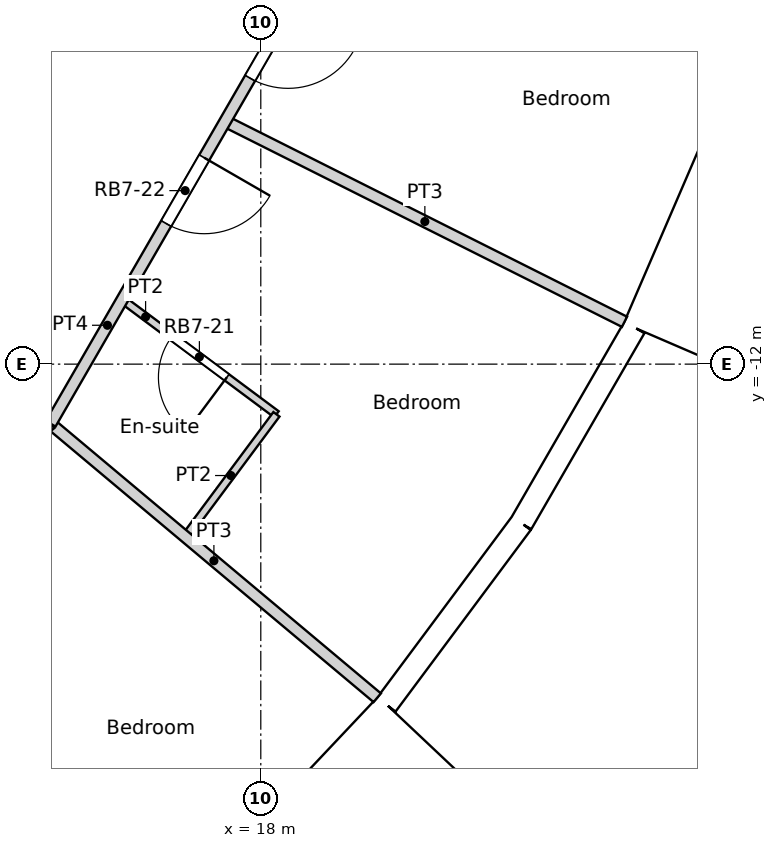
"""IFC4 building model, lengths in metres.
Left out: names, types, materials, properties, quantities, classifications, styles, units other than length and angle.
Written with IfcOpenShell. Run it as: python <this file> out.ifc"""

import sys

from ifc_helpers import new_model, si_unit, direction, frame, frame_2d, origin, origin_2d, place, context, subcontext, project, spatial, rectangle, circle, extrude, element, fill, save


model = new_model("IFC4")
c1 = context("Model", 3, precision=1e-05, world=origin(), true_north=direction((0.0, 1.0)))
c2 = subcontext(c1, "Body", "Model", "MODEL_VIEW")
j1 = project(units=[si_unit("LENGTHUNIT", "METRE"), si_unit("PLANEANGLEUNIT", "RADIAN")], contexts=[c1])
p1 = place(None, origin())
s1 = spatial("IfcSite", under=j1, at=p1, CompositionType="ELEMENT")
p2 = place(p1, origin())
s2 = spatial("IfcBuilding", under=s1, at=p2, CompositionType="ELEMENT")
p3 = place(p2, frame((0.0, 0.0, 190.8)))
s3 = spatial("IfcBuildingStorey", under=s2, at=p3, CompositionType="ELEMENT", Elevation=190.8)
for number, where, z_axis, x_axis in (
    (1, (18.805, -15.779, 0.0), (0.0, 0.0, 1.0), (1.0, 0.0, 0.0)),
    (2, (21.937, -11.017, 0.0), (0.0, 0.0, 1.0), (1.0, 0.0, 0.0)),
):
    element("IfcColumn", number, at=place(p3, frame(where, z_axis=z_axis, x_axis=x_axis)), inside=s3, PredefinedType="COLUMN", context=c2, shape_type="SweptSolid", body=[
        extrude(circle(Radius=0.6, at=origin_2d()), origin(), (0.0, 0.0, 1.0), 3.6),
    ])
p4 = place(p3, frame((15.552, -10.603, 0.0), z_axis=(0.0, 0.0, 1.0), x_axis=(1.0, 0.0, 0.0)))
e3 = element("IfcColumn", 3, at=p4, inside=s3, PredefinedType="COLUMN", context=c2, shape_type="SweptSolid", body=[
    extrude(circle(Radius=0.65, at=origin_2d()), origin(), (0.0, 0.0, 1.0), 3.6),
])
p5 = place(p3, frame((18.013, -19.056, -0.3), z_axis=(0.0, 0.0, 1.0), x_axis=(0.686217177108, 0.727396718334, 0.0)))
e4 = element("IfcWall", 4, at=p5, inside=s3, PredefinedType="ELEMENTEDWALL", context=c2, shape_type="SweptSolid", body=[
    extrude(rectangle(XDim=3.0, YDim=1.45, at=frame_2d((1.5, 0.0))), origin(), (0.0, 0.0, 1.0), 3.6),
])
p6 = place(p5, frame((1.5, 0.0, 1.85)))
e5 = element("IfcOpeningElement", 5, at=p6, cuts=e4, PredefinedType="OPENING", context=c2, shape_type="SweptSolid", body=[
    extrude(circle(Radius=0.9, at=origin_2d()), frame((0.0, 0.735, 0.0), z_axis=(0.0, -1.0, 0.0), x_axis=(1.0, 0.0, 0.0)), (0.0, 0.0, 1.0), 1.47),
])
p7 = place(p3, frame((19.653, -16.478, 0.0), z_axis=(0.0, 0.0, 1.0), x_axis=(0.597197580538, 0.80209416517, 0.0)))
e6 = element("IfcWall", 6, at=p7, inside=s3, PredefinedType="SOLIDWALL", context=c2, shape_type="SweptSolid", body=[
    extrude(rectangle(XDim=2.973, YDim=0.3, at=frame_2d((1.486, 0.0))), origin(), (0.0, 0.0, 1.0), 2.8),
])
p8 = place(p7, frame((1.486, 0.0, 1.55)))
e7 = element("IfcOpeningElement", 7, at=p8, cuts=e6, PredefinedType="OPENING", context=c2, shape_type="SweptSolid", body=[
    extrude(circle(Radius=0.9, at=origin_2d()), frame((0.0, 0.16, 0.0), z_axis=(0.0, -1.0, 0.0), x_axis=(1.0, 0.0, 0.0)), (0.0, 0.0, 1.0), 0.32),
])
p9 = place(p3, frame((21.428, -14.094, 0.0), z_axis=(0.0, 0.0, 1.0), x_axis=(0.499954672104, 0.866051572276, 0.0)))
e8 = element("IfcWall", 8, at=p9, inside=s3, PredefinedType="SOLIDWALL", context=c2, shape_type="SweptSolid", body=[
    extrude(rectangle(XDim=2.973, YDim=0.3, at=frame_2d((1.486, 0.0))), origin(), (0.0, 0.0, 1.0), 3.3),
])
p10 = place(p9, frame((1.486, 0.0, 1.55)))
e9 = element("IfcOpeningElement", 9, at=p10, cuts=e8, PredefinedType="OPENING", context=c2, shape_type="SweptSolid", body=[
    extrude(circle(Radius=0.9, at=origin_2d()), frame((0.0, 0.16, 0.0), z_axis=(0.0, -1.0, 0.0), x_axis=(1.0, 0.0, 0.0)), (0.0, 0.0, 1.0), 0.32),
])
p11 = place(p3, frame((23.444, -11.746, -0.3), z_axis=(0.0, 0.0, 1.0), x_axis=(0.396079003245, 0.918216435917, 0.0)))
e10 = element("IfcWall", 10, at=p11, inside=s3, PredefinedType="ELEMENTEDWALL", context=c2, shape_type="SweptSolid", body=[
    extrude(rectangle(XDim=3.0, YDim=1.45, at=frame_2d((1.5, 0.0))), origin(), (0.0, 0.0, 1.0), 3.6),
])
p12 = place(p11, frame((1.5, 0.0, 1.85)))
e11 = element("IfcOpeningElement", 11, at=p12, cuts=e10, PredefinedType="OPENING", context=c2, shape_type="SweptSolid", body=[
    extrude(circle(Radius=0.9, at=origin_2d()), frame((0.0, 0.735, 0.0), z_axis=(0.0, -1.0, 0.0), x_axis=(1.0, 0.0, 0.0)), (0.0, 0.0, 1.0), 1.47),
])
p13 = place(p3, frame((9.943, -17.222, 0.0), z_axis=(0.0, 0.0, 1.0), x_axis=(0.766192104565, 0.642611592567, 0.0)))
e12 = element("IfcWall", 12, at=p13, inside=s3, PredefinedType="PARTITIONING", context=c2, shape_type="SweptSolid", body=[
    extrude(rectangle(XDim=6.906, YDim=0.15, at=frame_2d((3.453, 0.0))), origin(), (0.0, 0.0, 1.0), 3.3),
])
p14 = place(p13, frame((5.537, 0.0, 0.0)))
e13 = element("IfcOpeningElement", 13, at=p14, cuts=e12, PredefinedType="OPENING", context=c2, shape_type="SweptSolid", body=[
    extrude(rectangle(XDim=1.0, YDim=2.1, at=frame_2d((0.5, 1.05))), frame((0.0, 0.075, 0.0), z_axis=(0.0, -1.0, 0.0), x_axis=(1.0, 0.0, 0.0)), (0.0, 0.0, 1.0), 0.15),
])
p15 = place(p3, frame((15.235, -12.784, 0.0), z_axis=(0.0, 0.0, 1.0), x_axis=(0.499982531118, 0.866035489213, 0.0)))
e14 = element("IfcWall", 14, at=p15, inside=s3, PredefinedType="PARTITIONING", context=c2, shape_type="SweptSolid", body=[
    extrude(rectangle(XDim=6.907, YDim=0.15, at=frame_2d((3.454, 0.0))), origin(), (0.0, 0.0, 1.0), 3.3),
])
p16 = place(p15, frame((3.041, 0.0, 0.0)))
e15 = element("IfcOpeningElement", 15, at=p16, cuts=e14, PredefinedType="OPENING", context=c2, shape_type="SweptSolid", body=[
    extrude(rectangle(XDim=1.0, YDim=2.1, at=frame_2d((0.5, 1.05))), frame((0.0, 0.075, 0.0), z_axis=(0.0, -1.0, 0.0), x_axis=(1.0, 0.0, 0.0)), (0.0, 0.0, 1.0), 0.15),
])
p17 = place(p15, frame((5.249, 0.0, 0.0)))
e16 = element("IfcOpeningElement", 16, at=p17, cuts=e14, PredefinedType="OPENING", context=c2, shape_type="SweptSolid", body=[
    extrude(rectangle(XDim=1.0, YDim=2.1, at=frame_2d((0.5, 1.05))), frame((0.0, 0.075, 0.0), z_axis=(0.0, -1.0, 0.0), x_axis=(1.0, 0.0, 0.0)), (0.0, 0.0, 1.0), 0.15),
])
p18 = place(p3, frame((11.717, -15.736, 0.0), z_axis=(0.0, 0.0, 1.0), x_axis=(0.597012012598, -0.802232296043, 0.0)))
e17 = element("IfcWall", 17, at=p18, inside=s3, PredefinedType="PARTITIONING", context=c2, shape_type="SweptSolid", body=[
    extrude(rectangle(XDim=5.878, YDim=0.15, at=frame_2d((2.939, 0.0))), origin(), (0.0, 0.0, 1.0), 3.3),
])
p19 = place(p3, frame((15.234, -12.785, 0.0), z_axis=(0.0, 0.0, 1.0), x_axis=(0.766230257274, -0.642566099976, 0.0)))
e18 = element("IfcWall", 18, at=p19, inside=s3, PredefinedType="PARTITIONING", context=c2, shape_type="SweptSolid", body=[
    extrude(rectangle(XDim=5.609, YDim=0.15, at=frame_2d((2.804, 0.0))), origin(), (0.0, 0.0, 1.0), 3.3),
])
p20 = place(p3, frame((17.007, -14.271, 0.0), z_axis=(0.0, 0.0, 1.0), x_axis=(0.597019866774, 0.802226450996, 0.0)))
e19 = element("IfcWall", 19, at=p20, inside=s3, PredefinedType="PARTITIONING", context=c2, shape_type="SweptSolid", body=[
    extrude(rectangle(XDim=2.008, YDim=0.1, at=frame_2d((1.004, 0.0))), origin(), (0.0, 0.0, 1.0), 3.3),
])
p21 = place(p3, frame((16.178, -11.15, 0.0), z_axis=(0.0, 0.0, 1.0), x_axis=(0.8020923136, -0.597200067367, 0.0)))
e20 = element("IfcWall", 20, at=p21, inside=s3, PredefinedType="PARTITIONING", context=c2, shape_type="SweptSolid", body=[
    extrude(rectangle(XDim=2.529, YDim=0.1, at=frame_2d((1.264, 0.0))), origin(), (0.0, 0.0, 1.0), 3.3),
])
p22 = place(p21, frame((0.814, 0.0, 0.0)))
e21 = element("IfcOpeningElement", 21, at=p22, cuts=e20, PredefinedType="OPENING", context=c2, shape_type="SweptSolid", body=[
    extrude(rectangle(XDim=0.9, YDim=2.04, at=frame_2d((0.45, 1.02))), frame((0.0, 0.05, 0.0), z_axis=(0.0, -1.0, 0.0), x_axis=(1.0, 0.0, 0.0)), (0.0, 0.0, 1.0), 0.1),
])
p23 = place(p3, frame((17.532, -8.805, 0.0), z_axis=(0.0, 0.0, 1.0), x_axis=(0.893628331628, -0.448807759415, 0.0)))
e22 = element("IfcWall", 22, at=p23, inside=s3, PredefinedType="PARTITIONING", context=c2, shape_type="SweptSolid", body=[
    extrude(rectangle(XDim=5.878, YDim=0.15, at=frame_2d((2.939, 0.0))), origin(), (0.0, 0.0, 1.0), 3.3),
])
p24 = place(p6, origin())
e23 = element("IfcWindow", 23, at=p24, inside=s3, PartitioningType="SINGLE_PANEL", PredefinedType="WINDOW", context=c2, shape_type="SweptSolid", body=[
    extrude(circle(Radius=0.9, at=origin_2d()), frame((0.0, 0.695, 0.0), z_axis=(0.0, -1.0, 0.0), x_axis=(1.0, 0.0, 0.0)), (0.0, 0.0, 1.0), 0.1),
])
fill(e5, e23)
p25 = place(p8, origin())
e24 = element("IfcWindow", 24, at=p25, inside=s3, PartitioningType="SINGLE_PANEL", PredefinedType="WINDOW", context=c2, shape_type="SweptSolid", body=[
    extrude(circle(Radius=0.9, at=origin_2d()), frame((0.0, 0.12, 0.0), z_axis=(0.0, -1.0, 0.0), x_axis=(1.0, 0.0, 0.0)), (0.0, 0.0, 1.0), 0.1),
])
fill(e7, e24)
p26 = place(p10, origin())
e25 = element("IfcWindow", 25, at=p26, inside=s3, PartitioningType="SINGLE_PANEL", PredefinedType="WINDOW", context=c2, shape_type="SweptSolid", body=[
    extrude(circle(Radius=0.9, at=origin_2d()), frame((0.0, 0.12, 0.0), z_axis=(0.0, -1.0, 0.0), x_axis=(1.0, 0.0, 0.0)), (0.0, 0.0, 1.0), 0.1),
])
fill(e9, e25)
p27 = place(p12, origin())
e26 = element("IfcWindow", 26, at=p27, inside=s3, PartitioningType="SINGLE_PANEL", PredefinedType="WINDOW", context=c2, shape_type="SweptSolid", body=[
    extrude(circle(Radius=0.9, at=origin_2d()), frame((0.0, 0.695, 0.0), z_axis=(0.0, -1.0, 0.0), x_axis=(1.0, 0.0, 0.0)), (0.0, 0.0, 1.0), 0.1),
])
fill(e11, e26)
p28 = place(p22, origin())
e27 = element("IfcDoor", 27, at=p28, inside=s3, OperationType="SINGLE_SWING_LEFT", PredefinedType="DOOR", context=c2, shape_type="SweptSolid", body=[
    extrude(rectangle(XDim=0.9, YDim=2.04, at=frame_2d((0.45, 1.02))), frame((0.0, 0.025, 0.0), z_axis=(0.0, -1.0, 0.0), x_axis=(1.0, 0.0, 0.0)), (0.0, 0.0, 1.0), 0.05),
])
fill(e21, e27)
p29 = place(p16, origin())
e28 = element("IfcDoor", 28, at=p29, inside=s3, OperationType="SINGLE_SWING_LEFT", PredefinedType="DOOR", context=c2, shape_type="SweptSolid", body=[
    extrude(rectangle(XDim=1.0, YDim=2.1, at=frame_2d((0.5, 1.05))), frame((0.0, 0.025, 0.0), z_axis=(0.0, -1.0, 0.0), x_axis=(1.0, 0.0, 0.0)), (0.0, 0.0, 1.0), 0.05),
])
fill(e15, e28)
p30 = place(p17, origin())
e29 = element("IfcDoor", 29, at=p30, inside=s3, OperationType="SINGLE_SWING_LEFT", PredefinedType="DOOR", context=c2, shape_type="SweptSolid", body=[
    extrude(rectangle(XDim=1.0, YDim=2.1, at=frame_2d((0.5, 1.05))), frame((0.0, 0.025, 0.0), z_axis=(0.0, -1.0, 0.0), x_axis=(1.0, 0.0, 0.0)), (0.0, 0.0, 1.0), 0.05),
])
fill(e16, e29)
save(model, sys.argv[1])
